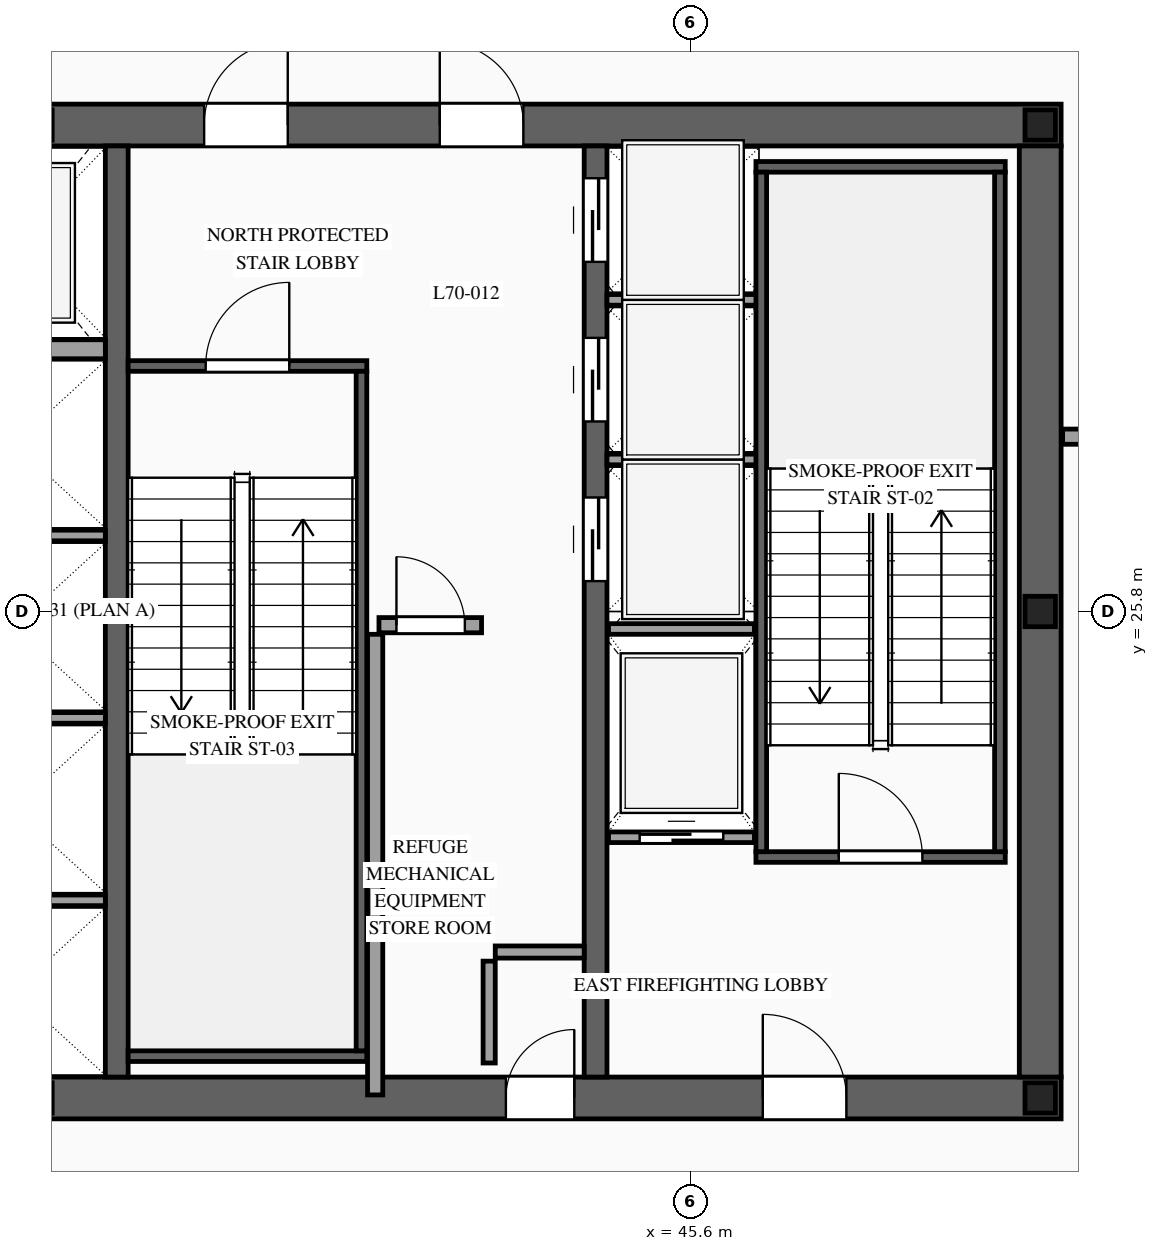
"""IFC4 building model, lengths in metres.
Left out: names, types, materials, properties, quantities, classifications, styles, units other than length and angle.
Written with IfcOpenShell. Run it as: python <this file> out.ifc"""

import sys

from ifc_helpers import new_model, si_unit, direction, frame, frame_2d, origin, origin_2d, place, context, subcontext, project, spatial, rectangle, i_section, extrude, source, transform, mapped, element, fill, save


model = new_model("IFC4")
c1 = context("Model", 3, precision=1e-05, world=origin(), true_north=direction((0.0, 1.0)))
c2 = subcontext(c1, "Body", "Model", "MODEL_VIEW")
j1 = project(units=[si_unit("LENGTHUNIT", "METRE"), si_unit("PLANEANGLEUNIT", "RADIAN")], contexts=[c1])
p1 = place(None, origin())
s1 = spatial("IfcSite", under=j1, at=p1, CompositionType="ELEMENT")
p2 = place(p1, origin())
s2 = spatial("IfcBuilding", under=s1, at=p2, CompositionType="ELEMENT")
p3 = place(p2, frame((0.0, 0.0, 263.5)))
s3 = spatial("IfcBuildingStorey", under=s2, at=p3, CompositionType="ELEMENT", Elevation=263.5)
p4 = place(p3, frame((23.525, 19.4, 0.0), z_axis=(0.0, 0.0, 1.0), x_axis=(1.0, 0.0, 0.0)))
e1 = element("IfcWall", 1, at=p4, inside=s3, PredefinedType="SHEAR", context=c2, shape_type="SweptSolid", body=[
    extrude(rectangle(XDim=26.95, YDim=0.55, at=frame_2d((13.475, 0.0))), origin(), (0.0, 0.0, 1.0), 4.6),
])
p5 = place(p4, frame((1.925, 0.0, 0.0)))
e2 = element("IfcOpeningElement", 2, at=p5, cuts=e1, PredefinedType="OPENING", context=c2, shape_type="SweptSolid", body=[
    extrude(rectangle(XDim=1.1, YDim=2.2, at=frame_2d((0.55, 1.1))), frame((0.0, 0.29, 0.0), z_axis=(0.0, -1.0, 0.0), x_axis=(1.0, 0.0, 0.0)), (0.0, 0.0, 1.0), 0.58),
])
p6 = place(p4, frame((9.825, 0.0, 0.0)))
e3 = element("IfcOpeningElement", 3, at=p6, cuts=e1, PredefinedType="OPENING", context=c2, shape_type="SweptSolid", body=[
    extrude(rectangle(XDim=1.1, YDim=2.2, at=frame_2d((0.55, 1.1))), frame((0.0, 0.29, 0.0), z_axis=(0.0, -1.0, 0.0), x_axis=(1.0, 0.0, 0.0)), (0.0, 0.0, 1.0), 0.58),
])
p7 = place(p4, frame((23.025, 0.0, 0.0)))
e4 = element("IfcOpeningElement", 4, at=p7, cuts=e1, PredefinedType="OPENING", context=c2, shape_type="SweptSolid", body=[
    extrude(rectangle(XDim=1.1, YDim=2.2, at=frame_2d((0.55, 1.1))), frame((0.0, 0.29, 0.0), z_axis=(0.0, -1.0, 0.0), x_axis=(1.0, 0.0, 0.0)), (0.0, 0.0, 1.0), 0.58),
])
p8 = place(p4, frame((19.645, 0.0, 0.0)))
e5 = element("IfcOpeningElement", 5, at=p8, cuts=e1, PredefinedType="OPENING", context=c2, shape_type="SweptSolid", body=[
    extrude(rectangle(XDim=0.9, YDim=2.15, at=frame_2d((0.45, 1.075))), frame((0.0, 0.29, 0.0), z_axis=(0.0, -1.0, 0.0), x_axis=(1.0, 0.0, 0.0)), (0.0, 0.0, 1.0), 0.58),
])
p9 = place(p3, frame((23.525, 32.2, 0.0), z_axis=(0.0, 0.0, 1.0), x_axis=(1.0, 0.0, 0.0)))
e6 = element("IfcWall", 6, at=p9, inside=s3, PredefinedType="SHEAR", context=c2, shape_type="SweptSolid", body=[
    extrude(rectangle(XDim=26.95, YDim=0.55, at=frame_2d((13.475, 0.0))), origin(), (0.0, 0.0, 1.0), 4.6),
])
p10 = place(p9, frame((4.545, 0.0, 0.0)))
e7 = element("IfcOpeningElement", 7, at=p10, cuts=e6, PredefinedType="OPENING", context=c2, shape_type="SweptSolid", body=[
    extrude(rectangle(XDim=0.9, YDim=2.15, at=frame_2d((0.45, 1.075))), frame((0.0, 0.29, 0.0), z_axis=(0.0, -1.0, 0.0), x_axis=(1.0, 0.0, 0.0)), (0.0, 0.0, 1.0), 0.58),
])
p11 = place(p9, frame((9.825, 0.0, 0.0)))
e8 = element("IfcOpeningElement", 8, at=p11, cuts=e6, PredefinedType="OPENING", context=c2, shape_type="SweptSolid", body=[
    extrude(rectangle(XDim=1.1, YDim=2.2, at=frame_2d((0.55, 1.1))), frame((0.0, 0.29, 0.0), z_axis=(0.0, -1.0, 0.0), x_axis=(1.0, 0.0, 0.0)), (0.0, 0.0, 1.0), 0.58),
])
p12 = place(p9, frame((15.675, 0.0, 0.0)))
e9 = element("IfcOpeningElement", 9, at=p12, cuts=e6, PredefinedType="OPENING", context=c2, shape_type="SweptSolid", body=[
    extrude(rectangle(XDim=1.1, YDim=2.2, at=frame_2d((0.55, 1.1))), frame((0.0, 0.29, 0.0), z_axis=(0.0, -1.0, 0.0), x_axis=(1.0, 0.0, 0.0)), (0.0, 0.0, 1.0), 0.58),
])
p13 = place(p9, frame((18.775, 0.0, 0.0)))
e10 = element("IfcOpeningElement", 10, at=p13, cuts=e6, PredefinedType="OPENING", context=c2, shape_type="SweptSolid", body=[
    extrude(rectangle(XDim=1.1, YDim=2.2, at=frame_2d((0.55, 1.1))), frame((0.0, 0.29, 0.0), z_axis=(0.0, -1.0, 0.0), x_axis=(1.0, 0.0, 0.0)), (0.0, 0.0, 1.0), 0.58),
])
m1 = source(origin(), c2, "Body", "SweptSolid", [
    extrude(rectangle(XDim=12.25, YDim=0.55, at=frame_2d((6.125, 0.0))), origin(), (0.0, 0.0, 1.0), 4.6),
])
p14 = place(p3, frame((50.2, 19.675, 0.0), z_axis=(0.0, 0.0, 1.0), x_axis=(0.0, 1.0, 0.0)))
e11 = element("IfcWall", 11, at=p14, inside=s3, PredefinedType="SHEAR", context=c2, shape_type="MappedRepresentation", body=[
    mapped(m1, transform((0.0, 0.0, 0.0), scale=1.0)),
])
m2 = source(origin(), c2, "Body", "SweptSolid", [
    extrude(rectangle(XDim=12.25, YDim=0.3, at=frame_2d((6.125, 0.0))), origin(), (0.0, 0.0, 1.0), 4.6),
])
p15 = place(p3, frame((38.05, 19.675, 0.0), z_axis=(0.0, 0.0, 1.0), x_axis=(0.0, 1.0, 0.0)))
e12 = element("IfcWall", 12, at=p15, inside=s3, PredefinedType="SOLIDWALL", context=c2, shape_type="MappedRepresentation", body=[
    mapped(m2, transform((0.0, 0.0, 0.0), scale=1.0)),
])
p16 = place(p3, frame((44.35, 19.675, 0.0), z_axis=(0.0, 0.0, 1.0), x_axis=(0.0, 1.0, 0.0)))
e13 = element("IfcWall", 13, at=p16, inside=s3, PredefinedType="SOLIDWALL", context=c2, shape_type="SweptSolid", body=[
    extrude(rectangle(XDim=12.25, YDim=0.3, at=frame_2d((6.125, 0.0))), origin(), (0.0, 0.0, 1.0), 4.6),
])
p17 = place(p16, frame((6.525, 0.0, 0.0)))
e14 = element("IfcOpeningElement", 14, at=p17, cuts=e13, PredefinedType="OPENING", context=c2, shape_type="SweptSolid", body=[
    extrude(rectangle(XDim=1.1, YDim=2.2, at=frame_2d((0.55, 1.1))), frame((0.0, 0.165, 0.0), z_axis=(0.0, -1.0, 0.0), x_axis=(1.0, 0.0, 0.0)), (0.0, 0.0, 1.0), 0.33),
])
p18 = place(p16, frame((8.625, 0.0, 0.0)))
e15 = element("IfcOpeningElement", 15, at=p18, cuts=e13, PredefinedType="OPENING", context=c2, shape_type="SweptSolid", body=[
    extrude(rectangle(XDim=1.1, YDim=2.2, at=frame_2d((0.55, 1.1))), frame((0.0, 0.165, 0.0), z_axis=(0.0, -1.0, 0.0), x_axis=(1.0, 0.0, 0.0)), (0.0, 0.0, 1.0), 0.33),
])
p19 = place(p16, frame((10.725, 0.0, 0.0)))
e16 = element("IfcOpeningElement", 16, at=p19, cuts=e13, PredefinedType="OPENING", context=c2, shape_type="SweptSolid", body=[
    extrude(rectangle(XDim=1.1, YDim=2.2, at=frame_2d((0.55, 1.1))), frame((0.0, 0.165, 0.0), z_axis=(0.0, -1.0, 0.0), x_axis=(1.0, 0.0, 0.0)), (0.0, 0.0, 1.0), 0.33),
])
m3 = source(origin(), c2, "Body", "SweptSolid", [
    extrude(i_section(OverallWidth=0.4, OverallDepth=0.4, WebThickness=0.013, FlangeThickness=0.021, at=origin_2d()), origin(), (0.0, 0.0, 1.0), 4.6),
])
for number, where, z_axis, x_axis in (
    (17, (50.2, 19.4, 0.0), (0.0, 0.0, 1.0), (1.0, 0.0, 0.0)),
    (18, (50.2, 25.8, 0.0), (0.0, 0.0, 1.0), (1.0, 0.0, 0.0)),
    (19, (50.2, 32.2, 0.0), (0.0, 0.0, 1.0), (1.0, 0.0, 0.0)),
):
    element("IfcColumn", number, at=place(p3, frame(where, z_axis=z_axis, x_axis=x_axis)), inside=s3, PredefinedType="COLUMN", context=c2, shape_type="MappedRepresentation", body=[
        mapped(m3, transform((0.0, 0.0, 0.0), scale=1.0)),
    ])
p20 = place(p3, frame((44.52, 22.83, 0.0), z_axis=(0.0, 0.0, 1.0), x_axis=(1.0, 0.0, 0.0)))
e20 = element("IfcWall", 20, at=p20, inside=s3, PredefinedType="SOLIDWALL", context=c2, shape_type="SweptSolid", body=[
    extrude(rectangle(XDim=1.92, YDim=0.14, at=frame_2d((0.96, 0.0))), origin(), (0.0, 0.0, 1.0), 4.38),
])
p21 = place(p20, frame((0.41, 0.0, 0.0)))
e21 = element("IfcOpeningElement", 21, at=p21, cuts=e20, PredefinedType="OPENING", context=c2, shape_type="SweptSolid", body=[
    extrude(rectangle(XDim=1.1, YDim=2.2, at=frame_2d((0.55, 1.1))), frame((0.0, 0.085, 0.0), z_axis=(0.0, -1.0, 0.0), x_axis=(1.0, 0.0, 0.0)), (0.0, 0.0, 1.0), 0.17),
])
m4 = source(origin(), c2, "Body", "SweptSolid", [
    extrude(rectangle(XDim=1.92, YDim=0.14, at=frame_2d((0.96, 0.0))), origin(), (0.0, 0.0, 1.0), 4.38),
])
p22 = place(p3, frame((44.52, 25.57, 0.0), z_axis=(0.0, 0.0, 1.0), x_axis=(1.0, 0.0, 0.0)))
e22 = element("IfcWall", 22, at=p22, inside=s3, PredefinedType="SOLIDWALL", context=c2, shape_type="MappedRepresentation", body=[
    mapped(m4, transform((0.0, 0.0, 0.0), scale=1.0)),
])
m5 = source(origin(), c2, "Body", "SweptSolid", [
    extrude(rectangle(XDim=2.4, YDim=0.14, at=frame_2d((1.2, 0.0))), origin(), (0.0, 0.0, 1.0), 4.38),
])
for number, where, z_axis, x_axis in (
    (23, (35.5, 22.0, 0.0), (0.0, 0.0, 1.0), (1.0, 0.0, 0.0)),
    (24, (35.5, 24.4, 0.0), (0.0, 0.0, 1.0), (1.0, 0.0, 0.0)),
    (25, (35.5, 26.8, 0.0), (0.0, 0.0, 1.0), (1.0, 0.0, 0.0)),
):
    element("IfcWall", number, at=place(p3, frame(where, z_axis=z_axis, x_axis=x_axis)), inside=s3, PredefinedType="SOLIDWALL", context=c2, shape_type="MappedRepresentation", body=[
        mapped(m5, transform((0.0, 0.0, 0.0), scale=1.0)),
    ])
m6 = source(origin(), c2, "Body", "SweptSolid", [
    extrude(rectangle(XDim=2.4, YDim=0.25, at=frame_2d((1.2, 0.0))), origin(), (0.0, 0.0, 1.0), 4.38),
])
p23 = place(p3, frame((35.5, 29.25, 0.0), z_axis=(0.0, 0.0, 1.0), x_axis=(1.0, 0.0, 0.0)))
e26 = element("IfcWall", 26, at=p23, inside=s3, PredefinedType="SOLIDWALL", context=c2, shape_type="MappedRepresentation", body=[
    mapped(m6, transform((0.0, 0.0, 0.0), scale=1.0)),
])
m7 = source(origin(), c2, "Body", "SweptSolid", [
    extrude(rectangle(XDim=2.0, YDim=0.14, at=frame_2d((1.0, 0.0))), origin(), (0.0, 0.0, 1.0), 4.38),
])
for number, where, z_axis, x_axis in (
    (27, (44.5, 27.8, 0.0), (0.0, 0.0, 1.0), (1.0, 0.0, 0.0)),
    (28, (44.5, 29.9, 0.0), (0.0, 0.0, 1.0), (1.0, 0.0, 0.0)),
):
    element("IfcWall", number, at=place(p3, frame(where, z_axis=z_axis, x_axis=x_axis)), inside=s3, PredefinedType="SOLIDWALL", context=c2, shape_type="MappedRepresentation", body=[
        mapped(m7, transform((0.0, 0.0, 0.0), scale=1.0)),
    ])
p24 = place(p3, frame((46.46, 22.57, 0.0), z_axis=(0.0, 0.0, 1.0), x_axis=(1.0, 0.0, 0.0)))
e29 = element("IfcWall", 29, at=p24, inside=s3, PredefinedType="SOLIDWALL", context=c2, shape_type="SweptSolid", body=[
    extrude(rectangle(XDim=3.28, YDim=0.14, at=frame_2d((1.64, 0.0))), origin(), (0.0, 0.0, 1.0), 4.38),
])
p25 = place(p24, frame((1.09, 0.0, 0.0)))
e30 = element("IfcOpeningElement", 30, at=p25, cuts=e29, PredefinedType="OPENING", context=c2, shape_type="SweptSolid", body=[
    extrude(rectangle(XDim=1.1, YDim=2.2, at=frame_2d((0.55, 1.1))), frame((0.0, 0.085, 0.0), z_axis=(0.0, -1.0, 0.0), x_axis=(1.0, 0.0, 0.0)), (0.0, 0.0, 1.0), 0.17),
])
m8 = source(origin(), c2, "Body", "SweptSolid", [
    extrude(rectangle(XDim=3.28, YDim=0.14, at=frame_2d((1.64, 0.0))), origin(), (0.0, 0.0, 1.0), 4.38),
])
p26 = place(p3, frame((46.46, 31.65, 0.0), z_axis=(0.0, 0.0, 1.0), x_axis=(1.0, 0.0, 0.0)))
e31 = element("IfcWall", 31, at=p26, inside=s3, PredefinedType="SOLIDWALL", context=c2, shape_type="MappedRepresentation", body=[
    mapped(m8, transform((0.0, 0.0, 0.0), scale=1.0)),
])
m9 = source(origin(), c2, "Body", "SweptSolid", [
    extrude(rectangle(XDim=8.94, YDim=0.14, at=frame_2d((4.47, 0.0))), origin(), (0.0, 0.0, 1.0), 4.38),
])
for number, where, z_axis, x_axis in (
    (32, (46.53, 22.64, 0.0), (0.0, 0.0, 1.0), (0.0, 1.0, 0.0)),
    (33, (49.67, 22.64, 0.0), (0.0, 0.0, 1.0), (0.0, 1.0, 0.0)),
):
    element("IfcWall", number, at=place(p3, frame(where, z_axis=z_axis, x_axis=x_axis)), inside=s3, PredefinedType="SOLIDWALL", context=c2, shape_type="MappedRepresentation", body=[
        mapped(m9, transform((0.0, 0.0, 0.0), scale=1.0)),
    ])
p27 = place(p3, frame((38.2, 29.03, 0.0), z_axis=(0.0, 0.0, 1.0), x_axis=(1.0, 0.0, 0.0)))
e34 = element("IfcWall", 34, at=p27, inside=s3, PredefinedType="SOLIDWALL", context=c2, shape_type="SweptSolid", body=[
    extrude(rectangle(XDim=3.14, YDim=0.14, at=frame_2d((1.57, 0.0))), origin(), (0.0, 0.0, 1.0), 4.38),
])
p28 = place(p27, frame((1.02, 0.0, 0.0)))
e35 = element("IfcOpeningElement", 35, at=p28, cuts=e34, PredefinedType="OPENING", context=c2, shape_type="SweptSolid", body=[
    extrude(rectangle(XDim=1.1, YDim=2.2, at=frame_2d((0.55, 1.1))), frame((0.0, 0.085, 0.0), z_axis=(0.0, -1.0, 0.0), x_axis=(1.0, 0.0, 0.0)), (0.0, 0.0, 1.0), 0.17),
])
m10 = source(origin(), c2, "Body", "SweptSolid", [
    extrude(rectangle(XDim=3.14, YDim=0.14, at=frame_2d((1.57, 0.0))), origin(), (0.0, 0.0, 1.0), 4.38),
])
p29 = place(p3, frame((38.2, 19.95, 0.0), z_axis=(0.0, 0.0, 1.0), x_axis=(1.0, 0.0, 0.0)))
e36 = element("IfcWall", 36, at=p29, inside=s3, PredefinedType="SOLIDWALL", context=c2, shape_type="MappedRepresentation", body=[
    mapped(m10, transform((0.0, 0.0, 0.0), scale=1.0)),
])
m11 = source(origin(), c2, "Body", "SweptSolid", [
    extrude(rectangle(XDim=8.94, YDim=0.14, at=frame_2d((4.47, 0.0))), origin(), (0.0, 0.0, 1.0), 4.38),
])
p30 = place(p3, frame((41.27, 20.02, 0.0), z_axis=(0.0, 0.0, 1.0), x_axis=(0.0, 1.0, 0.0)))
e37 = element("IfcWall", 37, at=p30, inside=s3, PredefinedType="SOLIDWALL", context=c2, shape_type="MappedRepresentation", body=[
    mapped(m11, transform((0.0, 0.0, 0.0), scale=1.0)),
])
m12 = source(origin(), c2, "Body", "SweptSolid", [
    extrude(rectangle(XDim=1.34, YDim=0.16, at=frame_2d((0.67, 0.0))), origin(), (0.0, 0.0, 1.0), 4.38),
])
p31 = place(p3, frame((42.95, 19.86, 0.0), z_axis=(0.0, 0.0, 1.0), x_axis=(0.0, 1.0, 0.0)))
e38 = element("IfcWall", 38, at=p31, inside=s3, PredefinedType="PARTITIONING", context=c2, shape_type="MappedRepresentation", body=[
    mapped(m12, transform((0.0, 0.0, 0.0), scale=1.0)),
])
m13 = source(origin(), c2, "Body", "SweptSolid", [
    extrude(rectangle(XDim=1.17, YDim=0.16, at=frame_2d((0.585, 0.0))), origin(), (0.0, 0.0, 1.0), 4.38),
])
p32 = place(p3, frame((43.03, 21.32, 0.0), z_axis=(0.0, 0.0, 1.0), x_axis=(1.0, 0.0, 0.0)))
e39 = element("IfcWall", 39, at=p32, inside=s3, PredefinedType="PARTITIONING", context=c2, shape_type="MappedRepresentation", body=[
    mapped(m13, transform((0.0, 0.0, 0.0), scale=1.0)),
])
m14 = source(origin(), c2, "Body", "SweptSolid", [
    extrude(rectangle(XDim=6.06, YDim=0.2, at=frame_2d((3.03, 0.0))), origin(), (0.0, 0.0, 1.0), 4.38),
])
p33 = place(p3, frame((41.45, 19.44, 0.0), z_axis=(0.0, 0.0, 1.0), x_axis=(0.0, 1.0, 0.0)))
e40 = element("IfcWall", 40, at=p33, inside=s3, PredefinedType="PARTITIONING", context=c2, shape_type="MappedRepresentation", body=[
    mapped(m14, transform((0.0, 0.0, 0.0), scale=1.0)),
])
p34 = place(p3, frame((41.5, 25.62, 0.0), z_axis=(0.0, 0.0, 1.0), x_axis=(1.0, 0.0, 0.0)))
e41 = element("IfcWall", 41, at=p34, inside=s3, PredefinedType="PARTITIONING", context=c2, shape_type="SweptSolid", body=[
    extrude(rectangle(XDim=1.35, YDim=0.2, at=frame_2d((0.675, 0.0))), origin(), (0.0, 0.0, 1.0), 4.38),
])
p35 = place(p34, frame((0.23, 0.0, 0.0)))
e42 = element("IfcOpeningElement", 42, at=p35, cuts=e41, PredefinedType="OPENING", context=c2, shape_type="SweptSolid", body=[
    extrude(rectangle(XDim=0.9, YDim=2.15, at=frame_2d((0.45, 1.075))), frame((0.0, 0.115, 0.0), z_axis=(0.0, -1.0, 0.0), x_axis=(1.0, 0.0, 0.0)), (0.0, 0.0, 1.0), 0.23),
])
m15 = source(origin(), c2, "Body", "SweptSolid", [
    extrude(rectangle(XDim=1.555, YDim=0.2, at=frame_2d((0.777, 0.0))), origin(), (0.0, 0.0, 1.0), 4.38),
])
p36 = place(p3, frame((50.495, 28.1, 0.0), z_axis=(0.0, 0.0, 1.0), x_axis=(1.0, 0.0, 0.0)))
e43 = element("IfcWall", 43, at=p36, inside=s3, PredefinedType="PARTITIONING", context=c2, shape_type="MappedRepresentation", body=[
    mapped(m15, transform((0.0, 0.0, 0.0), scale=1.0)),
])
m16 = source(origin(), c2, "Body", "SweptSolid", [
    extrude(rectangle(XDim=1.1, YDim=2.2, at=frame_2d((0.55, 1.1))), frame((0.0, 0.025, 0.0), z_axis=(0.0, -1.0, 0.0), x_axis=(1.0, 0.0, 0.0)), (0.0, 0.0, 1.0), 0.05),
])
p37 = place(p21, origin())
e44 = element("IfcDoor", 44, at=p37, inside=s3, OperationType="SLIDING_TO_RIGHT", PredefinedType="DOOR", context=c2, shape_type="MappedRepresentation", body=[
    mapped(m16, transform((0.0, 0.0, 0.0), scale=1.0)),
])
fill(e21, e44)
p38 = place(p17, origin())
e45 = element("IfcDoor", 45, at=p38, inside=s3, OperationType="SLIDING_TO_LEFT", PredefinedType="DOOR", context=c2, shape_type="MappedRepresentation", body=[
    mapped(m16, transform((0.0, 0.0, 0.0), scale=1.0)),
])
fill(e14, e45)
p39 = place(p18, origin())
e46 = element("IfcDoor", 46, at=p39, inside=s3, OperationType="SLIDING_TO_RIGHT", PredefinedType="DOOR", context=c2, shape_type="MappedRepresentation", body=[
    mapped(m16, transform((0.0, 0.0, 0.0), scale=1.0)),
])
fill(e15, e46)
p40 = place(p19, origin())
e47 = element("IfcDoor", 47, at=p40, inside=s3, OperationType="SLIDING_TO_LEFT", PredefinedType="DOOR", context=c2, shape_type="MappedRepresentation", body=[
    mapped(m16, transform((0.0, 0.0, 0.0), scale=1.0)),
])
fill(e16, e47)
m17 = source(origin(), c2, "Body", "SweptSolid", [
    extrude(rectangle(XDim=1.1, YDim=2.2, at=frame_2d((0.55, 1.1))), frame((0.0, 0.025, 0.0), z_axis=(0.0, -1.0, 0.0), x_axis=(1.0, 0.0, 0.0)), (0.0, 0.0, 1.0), 0.05),
])
p41 = place(p25, origin())
e48 = element("IfcDoor", 48, at=p41, inside=s3, OperationType="SINGLE_SWING_LEFT", PredefinedType="DOOR", context=c2, shape_type="MappedRepresentation", body=[
    mapped(m17, transform((0.0, 0.0, 0.0), scale=1.0)),
])
fill(e30, e48)
p42 = place(p28, origin())
e49 = element("IfcDoor", 49, at=p42, inside=s3, OperationType="SINGLE_SWING_RIGHT", PredefinedType="DOOR", context=c2, shape_type="MappedRepresentation", body=[
    mapped(m17, transform((0.0, 0.0, 0.0), scale=1.0)),
])
fill(e35, e49)
p43 = place(p7, origin())
e50 = element("IfcDoor", 50, at=p43, inside=s3, OperationType="SINGLE_SWING_LEFT", PredefinedType="DOOR", context=c2, shape_type="MappedRepresentation", body=[
    mapped(m17, transform((0.0, 0.0, 0.0), scale=1.0)),
])
fill(e4, e50)
p44 = place(p12, origin())
e51 = element("IfcDoor", 51, at=p44, inside=s3, OperationType="SINGLE_SWING_RIGHT", PredefinedType="DOOR", context=c2, shape_type="MappedRepresentation", body=[
    mapped(m17, transform((0.0, 0.0, 0.0), scale=1.0)),
])
fill(e9, e51)
p45 = place(p13, origin())
e52 = element("IfcDoor", 52, at=p45, inside=s3, OperationType="SINGLE_SWING_LEFT", PredefinedType="DOOR", context=c2, shape_type="MappedRepresentation", body=[
    mapped(m17, transform((0.0, 0.0, 0.0), scale=1.0)),
])
fill(e10, e52)
m18 = source(origin(), c2, "Body", "SweptSolid", [
    extrude(rectangle(XDim=0.9, YDim=2.15, at=frame_2d((0.45, 1.075))), frame((0.0, 0.025, 0.0), z_axis=(0.0, -1.0, 0.0), x_axis=(1.0, 0.0, 0.0)), (0.0, 0.0, 1.0), 0.05),
])
p46 = place(p8, origin())
e53 = element("IfcDoor", 53, at=p46, inside=s3, OperationType="SINGLE_SWING_RIGHT", PredefinedType="DOOR", context=c2, shape_type="MappedRepresentation", body=[
    mapped(m18, transform((0.0, 0.0, 0.0), scale=1.0)),
])
fill(e5, e53)
p47 = place(p35, origin())
e54 = element("IfcDoor", 54, at=p47, inside=s3, OperationType="SINGLE_SWING_LEFT", PredefinedType="DOOR", context=c2, shape_type="MappedRepresentation", body=[
    mapped(m18, transform((0.0, 0.0, 0.0), scale=1.0)),
])
fill(e42, e54)
save(model, sys.argv[1])
